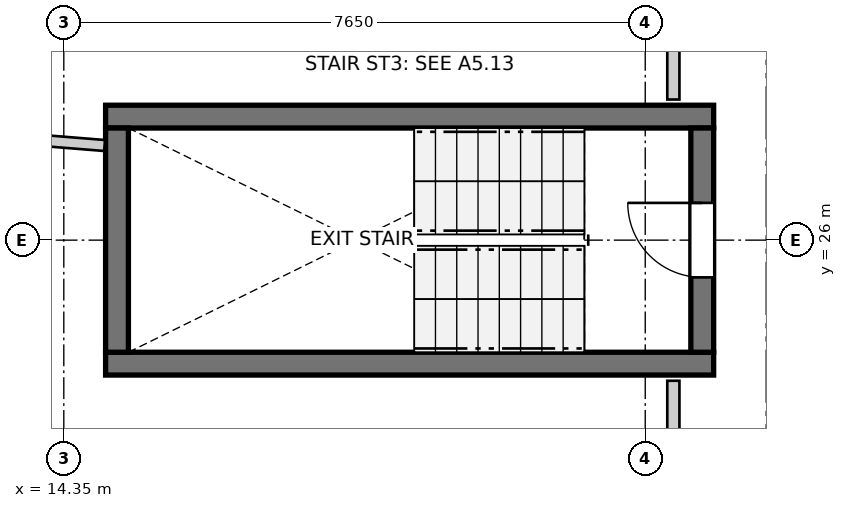
"""IFC4 building model, lengths in metres.
Left out: names, types, materials, properties, quantities, classifications, styles, units other than length and angle.
Written with IfcOpenShell. Run it as: python <this file> out.ifc"""

import sys

from ifc_helpers import new_model, si_unit, direction, frame, frame_2d, origin, place, context, subcontext, project, spatial, rectangle, extrude, source, transform, mapped, element, fill, save


model = new_model("IFC4")
c1 = context("Model", 3, precision=1e-05, world=origin(), true_north=direction((0.0, 1.0)))
c2 = subcontext(c1, "Body", "Model", "MODEL_VIEW")
j1 = project(units=[si_unit("LENGTHUNIT", "METRE"), si_unit("PLANEANGLEUNIT", "RADIAN")], contexts=[c1])
p1 = place(None, origin())
s1 = spatial("IfcSite", under=j1, at=p1, CompositionType="ELEMENT")
p2 = place(p1, origin())
s2 = spatial("IfcBuilding", under=s1, at=p2, CompositionType="ELEMENT")
p3 = place(p2, frame((0.0, 0.0, 168.2)))
s3 = spatial("IfcBuildingStorey", under=s2, at=p3, CompositionType="ELEMENT", Elevation=168.2)
for number, where, z_axis, x_axis in (
    (1, (14.9, 24.375, 0.0), (0.0, 0.0, 1.0), (1.0, 0.0, 0.0)),
    (2, (22.9, 27.625, 0.0), (0.0, 0.0, 1.0), (-1.0, 0.0, 0.0)),
):
    element("IfcWall", number, at=place(p3, frame(where, z_axis=z_axis, x_axis=x_axis)), inside=s3, PredefinedType="SHEAR", context=c2, shape_type="SweptSolid", body=[
        extrude(rectangle(XDim=8.0, YDim=0.3, at=frame_2d((4.0, 0.0))), origin(), (0.0, 0.0, 1.0), 2.95),
    ])
p4 = place(p3, frame((15.05, 27.475, 0.0), z_axis=(0.0, 0.0, 1.0), x_axis=(0.0, -1.0, 0.0)))
e3 = element("IfcWall", 3, at=p4, inside=s3, PredefinedType="SHEAR", context=c2, shape_type="SweptSolid", body=[
    extrude(rectangle(XDim=2.95, YDim=0.3, at=frame_2d((1.475, 0.0))), origin(), (0.0, 0.0, 1.0), 2.95),
])
p5 = place(p3, frame((22.75, 24.525, 0.0), z_axis=(0.0, 0.0, 1.0), x_axis=(0.0, 1.0, 0.0)))
e4 = element("IfcWall", 4, at=p5, inside=s3, PredefinedType="SHEAR", context=c2, shape_type="SweptSolid", body=[
    extrude(rectangle(XDim=2.95, YDim=0.3, at=frame_2d((1.475, 0.0))), origin(), (0.0, 0.0, 1.0), 2.95),
])
p6 = place(p5, frame((0.985, 0.0, 0.0)))
e5 = element("IfcOpeningElement", 5, at=p6, cuts=e4, PredefinedType="OPENING", context=c2, shape_type="SweptSolid", body=[
    extrude(rectangle(XDim=0.98, YDim=2.15, at=frame_2d((0.49, 1.075))), frame((0.0, 0.16, 0.0), z_axis=(0.0, -1.0, 0.0), x_axis=(1.0, 0.0, 0.0)), (0.0, 0.0, 1.0), 0.32),
])
p7 = place(p3, frame((22.37, 14.579, 0.0), z_axis=(0.0, 0.0, 1.0), x_axis=(0.0, 1.0, 0.0)))
e6 = element("IfcWall", 6, at=p7, inside=s3, PredefinedType="PARTITIONING", context=c2, shape_type="SweptSolid", body=[
    extrude(rectangle(XDim=9.571, YDim=0.16, at=frame_2d((4.785, 0.0))), origin(), (0.0, 0.0, 1.0), 2.95),
])
p8 = place(p7, frame((3.793, 0.0, 0.0)))
e7 = element("IfcOpeningElement", 7, at=p8, cuts=e6, PredefinedType="OPENING", context=c2, shape_type="SweptSolid", body=[
    extrude(rectangle(XDim=0.96, YDim=2.1, at=frame_2d((0.48, 1.05))), frame((0.0, 0.09, 0.0), z_axis=(0.0, -1.0, 0.0), x_axis=(1.0, 0.0, 0.0)), (0.0, 0.0, 1.0), 0.18),
])
p9 = place(p3, frame((22.37, 27.85, 0.0), z_axis=(0.0, 0.0, 1.0), x_axis=(0.0, 1.0, 0.0)))
e8 = element("IfcWall", 8, at=p9, inside=s3, PredefinedType="PARTITIONING", context=c2, shape_type="SweptSolid", body=[
    extrude(rectangle(XDim=4.759, YDim=0.16, at=frame_2d((2.379, 0.0))), origin(), (0.0, 0.0, 1.0), 2.95),
])
p10 = place(p9, frame((1.919, 0.0, 0.0)))
e9 = element("IfcOpeningElement", 9, at=p10, cuts=e8, PredefinedType="OPENING", context=c2, shape_type="SweptSolid", body=[
    extrude(rectangle(XDim=0.96, YDim=2.1, at=frame_2d((0.48, 1.05))), frame((0.0, 0.09, 0.0), z_axis=(0.0, -1.0, 0.0), x_axis=(1.0, 0.0, 0.0)), (0.0, 0.0, 1.0), 0.18),
])
p11 = place(p3, frame((8.015, 27.797, 0.0), z_axis=(0.0, 0.0, 1.0), x_axis=(0.996785477909, -0.080116858581, 0.0)))
e10 = element("IfcWall", 10, at=p11, inside=s3, PredefinedType="PARTITIONING", context=c2, shape_type="SweptSolid", body=[
    extrude(rectangle(XDim=6.893, YDim=0.145, at=frame_2d((3.447, 0.0))), origin(), (0.0, 0.0, 1.0), 2.95),
])
m1 = source(origin(), c2, "Body", "SweptSolid", [
    extrude(rectangle(XDim=0.98, YDim=2.15, at=frame_2d((0.49, 1.075))), frame((0.0, 0.025, 0.0), z_axis=(0.0, -1.0, 0.0), x_axis=(1.0, 0.0, 0.0)), (0.0, 0.0, 1.0), 0.05),
])
p12 = place(p6, origin())
e11 = element("IfcDoor", 11, at=p12, inside=s3, OperationType="SINGLE_SWING_RIGHT", PredefinedType="DOOR", context=c2, shape_type="MappedRepresentation", body=[
    mapped(m1, transform((0.0, 0.0, 0.0), x_axis=(1.0, 0.0, 0.0), y_axis=(0.0, 1.0, 0.0), z_axis=(0.0, 0.0, 1.0), scale=1.0)),
])
fill(e5, e11)
save(model, sys.argv[1])
